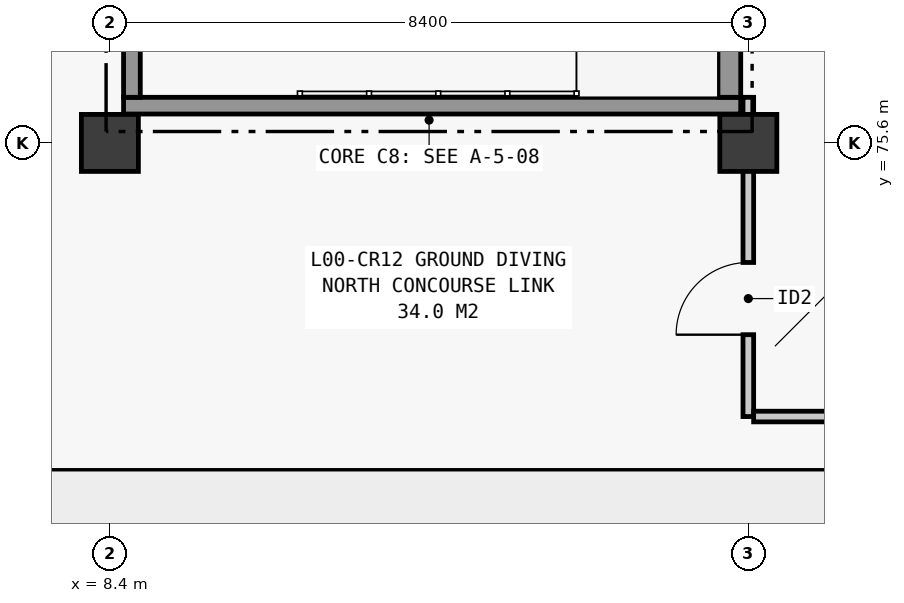
"""IFC4 building model, lengths in metres.
Left out: names, types, materials, properties, quantities, classifications, styles, units other than length and angle.
Written with IfcOpenShell. Run it as: python <this file> out.ifc"""

import sys

from ifc_helpers import new_model, si_unit, direction, frame, frame_2d, origin, origin_2d, place, context, subcontext, project, spatial, rectangle, extrude, element, fill, save


model = new_model("IFC4")
c1 = context("Model", 3, precision=1e-05, world=origin(), true_north=direction((0.0, 1.0)))
c2 = subcontext(c1, "Body", "Model", "MODEL_VIEW")
j1 = project(units=[si_unit("LENGTHUNIT", "METRE"), si_unit("PLANEANGLEUNIT", "RADIAN")], contexts=[c1])
p1 = place(None, origin())
s1 = spatial("IfcSite", under=j1, at=p1, CompositionType="ELEMENT")
p2 = place(p1, origin())
s2 = spatial("IfcBuilding", under=s1, at=p2, CompositionType="ELEMENT")
p3 = place(p2, origin())
s3 = spatial("IfcBuildingStorey", under=s2, at=p3, CompositionType="ELEMENT", Elevation=0.0)
for number, where, z_axis, x_axis in (
    (1, (8.4, 75.6, 0.0), (0.0, 0.0, 1.0), (1.0, 0.0, 0.0)),
    (2, (16.8, 75.6, 0.0), (0.0, 0.0, 1.0), (1.0, 0.0, 0.0)),
):
    element("IfcColumn", number, at=place(p3, frame(where, z_axis=z_axis, x_axis=x_axis)), inside=s3, PredefinedType="COLUMN", context=c2, shape_type="SweptSolid", body=[
        extrude(rectangle(XDim=0.75, YDim=0.75, at=origin_2d()), origin(), (0.0, 0.0, 1.0), 4.8),
    ])
p4 = place(p3, frame((8.58, 76.09, 0.0), z_axis=(0.0, 0.0, 1.0), x_axis=(1.0, 0.0, 0.0)))
e3 = element("IfcWall", 3, at=p4, inside=s3, PredefinedType="SOLIDWALL", context=c2, shape_type="SweptSolid", body=[
    extrude(rectangle(XDim=8.12, YDim=0.22, at=frame_2d((4.06, 0.0))), origin(), (0.0, 0.0, 1.0), 4.52),
])
p5 = place(p3, frame((16.55, 76.2, 0.0), z_axis=(0.0, 0.0, 1.0), x_axis=(0.0, 1.0, 0.0)))
e4 = element("IfcWall", 4, at=p5, inside=s3, PredefinedType="SHEAR", context=c2, shape_type="SweptSolid", body=[
    extrude(rectangle(XDim=3.43, YDim=0.3, at=frame_2d((1.715, 0.0))), origin(), (0.0, 0.0, 1.0), 4.52),
])
p6 = place(p3, frame((8.69, 79.63, 0.0), z_axis=(0.0, 0.0, 1.0), x_axis=(0.0, -1.0, 0.0)))
e5 = element("IfcWall", 5, at=p6, inside=s3, PredefinedType="SOLIDWALL", context=c2, shape_type="SweptSolid", body=[
    extrude(rectangle(XDim=3.43, YDim=0.22, at=frame_2d((1.715, 0.0))), origin(), (0.0, 0.0, 1.0), 4.52),
])
p7 = place(p6, frame((1.115, 0.0, 0.0)))
e6 = element("IfcOpeningElement", 6, at=p7, cuts=e5, PredefinedType="OPENING", context=c2, shape_type="SweptSolid", body=[
    extrude(rectangle(XDim=1.2, YDim=2.2, at=frame_2d((0.6, 1.1))), frame((0.0, 0.125, 0.0), z_axis=(0.0, -1.0, 0.0), x_axis=(1.0, 0.0, 0.0)), (0.0, 0.0, 1.0), 0.25),
])
p8 = place(p3, frame((16.8, 72.0, 0.0), z_axis=(0.0, 0.0, 1.0), x_axis=(0.0, 1.0, 0.0)))
e7 = element("IfcWall", 7, at=p8, inside=s3, PredefinedType="PARTITIONING", context=c2, shape_type="SweptSolid", body=[
    extrude(rectangle(XDim=4.2, YDim=0.14, at=frame_2d((2.1, 0.0))), origin(), (0.0, 0.0, 1.0), 4.52),
])
p9 = place(p8, frame((1.077, 0.0, 0.0)))
e8 = element("IfcOpeningElement", 8, at=p9, cuts=e7, PredefinedType="OPENING", context=c2, shape_type="SweptSolid", body=[
    extrude(rectangle(XDim=0.95, YDim=2.15, at=frame_2d((0.475, 1.075))), frame((0.0, 0.085, 0.0), z_axis=(0.0, -1.0, 0.0), x_axis=(1.0, 0.0, 0.0)), (0.0, 0.0, 1.0), 0.17),
])
p10 = place(p3, frame((16.87, 72.0, 0.0), z_axis=(0.0, 0.0, 1.0), x_axis=(1.0, 0.0, 0.0)))
e9 = element("IfcWall", 9, at=p10, inside=s3, PredefinedType="PARTITIONING", context=c2, shape_type="SweptSolid", body=[
    extrude(rectangle(XDim=8.06, YDim=0.14, at=frame_2d((4.03, 0.0))), origin(), (0.0, 0.0, 1.0), 4.52),
])
p11 = place(p9, origin())
e10 = element("IfcDoor", 10, at=p11, inside=s3, OperationType="SINGLE_SWING_LEFT", PredefinedType="DOOR", context=c2, shape_type="SweptSolid", body=[
    extrude(rectangle(XDim=0.95, YDim=2.15, at=frame_2d((0.475, 1.075))), frame((0.0, 0.025, 0.0), z_axis=(0.0, -1.0, 0.0), x_axis=(1.0, 0.0, 0.0)), (0.0, 0.0, 1.0), 0.05),
])
fill(e8, e10)
save(model, sys.argv[1])
